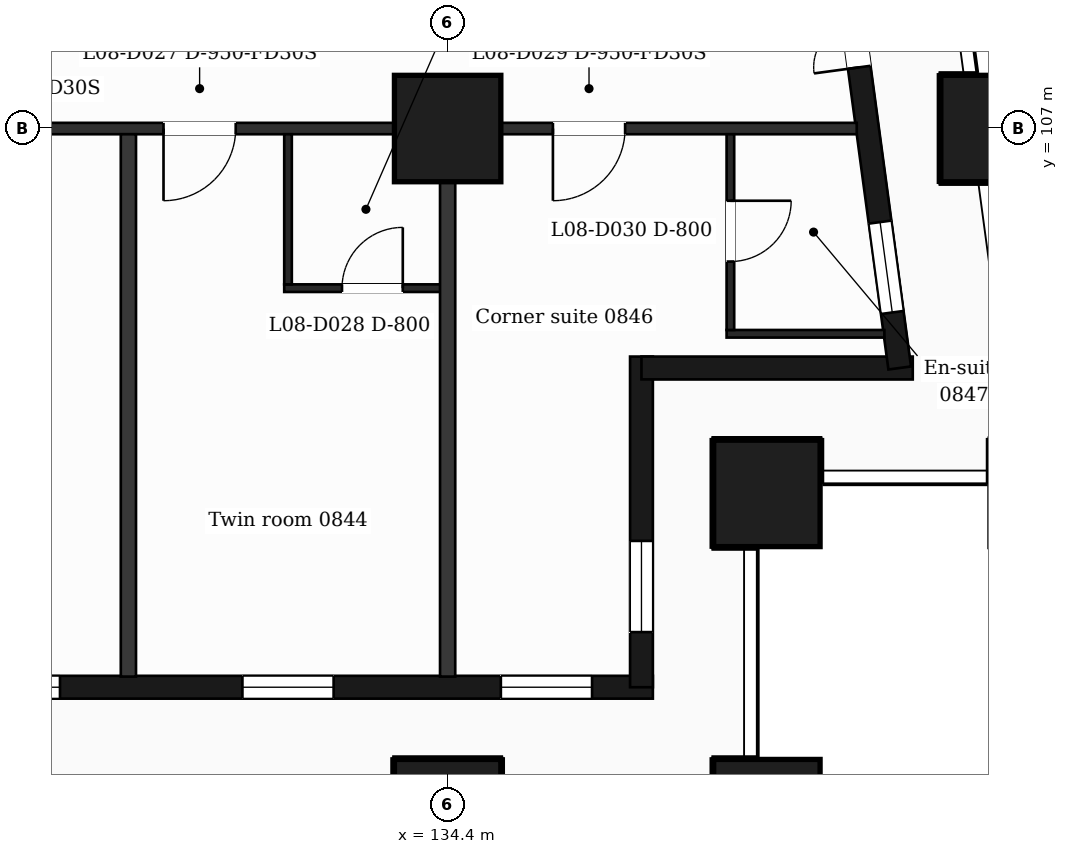
"""IFC4 building model, lengths in metres.
Left out: names, types, materials, properties, quantities, classifications, styles, units other than length and angle.
Written with IfcOpenShell. Run it as: python <this file> out.ifc"""

import sys

from ifc_helpers import new_model, si_unit, direction, frame, frame_2d, origin, origin_2d, place, context, subcontext, project, spatial, rectangle, extrude, element, fill, save


model = new_model("IFC4")
c1 = context("Model", 3, precision=1e-05, world=origin(), true_north=direction((0.0, 1.0)))
c2 = subcontext(c1, "Body", "Model", "MODEL_VIEW")
j1 = project(units=[si_unit("LENGTHUNIT", "METRE"), si_unit("PLANEANGLEUNIT", "RADIAN")], contexts=[c1])
p1 = place(None, origin())
s1 = spatial("IfcSite", under=j1, at=p1, CompositionType="ELEMENT")
p2 = place(p1, origin())
s2 = spatial("IfcBuilding", under=s1, at=p2, CompositionType="ELEMENT")
p3 = place(p2, frame((0.0, 0.0, 46.0)))
s3 = spatial("IfcBuildingStorey", under=s2, at=p3, CompositionType="ELEMENT", Elevation=46.0)
for number, where, z_axis, x_axis in (
    (1, (134.4, 98.0, 0.0), (0.0, 0.0, 1.0), (1.0, 0.0, 0.0)),
    (2, (138.6, 98.0, 0.0), (0.0, 0.0, 1.0), (1.0, 0.0, 0.0)),
    (3, (138.6, 102.2, 0.0), (0.0, 0.0, 1.0), (1.0, 0.0, 0.0)),
    (4, (134.4, 107.0, 0.0), (0.0, 0.0, 1.0), (1.0, 0.0, 0.0)),
    (5, (141.588, 107.0, 0.0), (0.0, 0.0, 1.0), (1.0, 0.0, 0.0)),
):
    element("IfcColumn", number, at=place(p3, frame(where, z_axis=z_axis, x_axis=x_axis)), inside=s3, PredefinedType="COLUMN", context=c2, shape_type="SweptSolid", body=[
        extrude(rectangle(XDim=1.4, YDim=1.4, at=origin_2d()), origin(), (0.0, 0.0, 1.0), 3.5),
    ])
p4 = place(p3, frame((89.85, 99.65, 0.0), z_axis=(0.0, 0.0, 1.0), x_axis=(1.0, 0.0, 0.0)))
e6 = element("IfcWall", 6, at=p4, inside=s3, PredefinedType="SOLIDWALL", context=c2, shape_type="SweptSolid", body=[
    extrude(rectangle(XDim=47.25, YDim=0.3, at=frame_2d((23.625, 0.0))), origin(), (0.0, 0.0, 1.0), 3.18),
])
p5 = place(p4, frame((0.725, 0.0, 0.9)))
e7 = element("IfcOpeningElement", 7, at=p5, cuts=e6, PredefinedType="OPENING", context=c2, shape_type="SweptSolid", body=[
    extrude(rectangle(XDim=1.2, YDim=2.1, at=frame_2d((0.6, 1.05))), frame((0.0, 0.16, 0.0), z_axis=(0.0, -1.0, 0.0), x_axis=(1.0, 0.0, 0.0)), (0.0, 0.0, 1.0), 0.32),
])
p6 = place(p4, frame((3.45, 0.0, 0.9)))
e8 = element("IfcOpeningElement", 8, at=p6, cuts=e6, PredefinedType="OPENING", context=c2, shape_type="SweptSolid", body=[
    extrude(rectangle(XDim=2.4, YDim=2.1, at=frame_2d((1.2, 1.05))), frame((0.0, 0.16, 0.0), z_axis=(0.0, -1.0, 0.0), x_axis=(1.0, 0.0, 0.0)), (0.0, 0.0, 1.0), 0.32),
])
p7 = place(p4, frame((7.65, 0.0, 0.9)))
e9 = element("IfcOpeningElement", 9, at=p7, cuts=e6, PredefinedType="OPENING", context=c2, shape_type="SweptSolid", body=[
    extrude(rectangle(XDim=2.4, YDim=2.1, at=frame_2d((1.2, 1.05))), frame((0.0, 0.16, 0.0), z_axis=(0.0, -1.0, 0.0), x_axis=(1.0, 0.0, 0.0)), (0.0, 0.0, 1.0), 0.32),
])
p8 = place(p4, frame((12.45, 0.0, 0.9)))
e10 = element("IfcOpeningElement", 10, at=p8, cuts=e6, PredefinedType="OPENING", context=c2, shape_type="SweptSolid", body=[
    extrude(rectangle(XDim=1.2, YDim=2.1, at=frame_2d((0.6, 1.05))), frame((0.0, 0.16, 0.0), z_axis=(0.0, -1.0, 0.0), x_axis=(1.0, 0.0, 0.0)), (0.0, 0.0, 1.0), 0.32),
])
p9 = place(p4, frame((16.65, 0.0, 0.9)))
e11 = element("IfcOpeningElement", 11, at=p9, cuts=e6, PredefinedType="OPENING", context=c2, shape_type="SweptSolid", body=[
    extrude(rectangle(XDim=1.2, YDim=2.1, at=frame_2d((0.6, 1.05))), frame((0.0, 0.16, 0.0), z_axis=(0.0, -1.0, 0.0), x_axis=(1.0, 0.0, 0.0)), (0.0, 0.0, 1.0), 0.32),
])
p10 = place(p4, frame((19.95, 0.0, 0.9)))
e12 = element("IfcOpeningElement", 12, at=p10, cuts=e6, PredefinedType="OPENING", context=c2, shape_type="SweptSolid", body=[
    extrude(rectangle(XDim=1.2, YDim=2.1, at=frame_2d((0.6, 1.05))), frame((0.0, 0.16, 0.0), z_axis=(0.0, -1.0, 0.0), x_axis=(1.0, 0.0, 0.0)), (0.0, 0.0, 1.0), 0.32),
])
p11 = place(p4, frame((21.75, 0.0, 0.9)))
e13 = element("IfcOpeningElement", 13, at=p11, cuts=e6, PredefinedType="OPENING", context=c2, shape_type="SweptSolid", body=[
    extrude(rectangle(XDim=1.2, YDim=2.1, at=frame_2d((0.6, 1.05))), frame((0.0, 0.16, 0.0), z_axis=(0.0, -1.0, 0.0), x_axis=(1.0, 0.0, 0.0)), (0.0, 0.0, 1.0), 0.32),
])
p12 = place(p4, frame((25.05, 0.0, 0.0)))
e14 = element("IfcOpeningElement", 14, at=p12, cuts=e6, PredefinedType="OPENING", context=c2, shape_type="SweptSolid", body=[
    extrude(rectangle(XDim=1.2, YDim=2.4, at=frame_2d((0.6, 1.2))), frame((0.0, 0.16, 0.0), z_axis=(0.0, -1.0, 0.0), x_axis=(1.0, 0.0, 0.0)), (0.0, 0.0, 1.0), 0.32),
])
p13 = place(p4, frame((28.35, 0.0, 0.9)))
e15 = element("IfcOpeningElement", 15, at=p13, cuts=e6, PredefinedType="OPENING", context=c2, shape_type="SweptSolid", body=[
    extrude(rectangle(XDim=1.2, YDim=2.1, at=frame_2d((0.6, 1.05))), frame((0.0, 0.16, 0.0), z_axis=(0.0, -1.0, 0.0), x_axis=(1.0, 0.0, 0.0)), (0.0, 0.0, 1.0), 0.32),
])
p14 = place(p4, frame((30.15, 0.0, 0.9)))
e16 = element("IfcOpeningElement", 16, at=p14, cuts=e6, PredefinedType="OPENING", context=c2, shape_type="SweptSolid", body=[
    extrude(rectangle(XDim=1.2, YDim=2.1, at=frame_2d((0.6, 1.05))), frame((0.0, 0.16, 0.0), z_axis=(0.0, -1.0, 0.0), x_axis=(1.0, 0.0, 0.0)), (0.0, 0.0, 1.0), 0.32),
])
p15 = place(p4, frame((32.85, 0.0, 0.9)))
e17 = element("IfcOpeningElement", 17, at=p15, cuts=e6, PredefinedType="OPENING", context=c2, shape_type="SweptSolid", body=[
    extrude(rectangle(XDim=2.4, YDim=2.1, at=frame_2d((1.2, 1.05))), frame((0.0, 0.16, 0.0), z_axis=(0.0, -1.0, 0.0), x_axis=(1.0, 0.0, 0.0)), (0.0, 0.0, 1.0), 0.32),
])
p16 = place(p4, frame((37.05, 0.0, 0.9)))
e18 = element("IfcOpeningElement", 18, at=p16, cuts=e6, PredefinedType="OPENING", context=c2, shape_type="SweptSolid", body=[
    extrude(rectangle(XDim=2.4, YDim=2.1, at=frame_2d((1.2, 1.05))), frame((0.0, 0.16, 0.0), z_axis=(0.0, -1.0, 0.0), x_axis=(1.0, 0.0, 0.0)), (0.0, 0.0, 1.0), 0.32),
])
p17 = place(p4, frame((41.85, 0.0, 0.9)))
e19 = element("IfcOpeningElement", 19, at=p17, cuts=e6, PredefinedType="OPENING", context=c2, shape_type="SweptSolid", body=[
    extrude(rectangle(XDim=1.2, YDim=2.1, at=frame_2d((0.6, 1.05))), frame((0.0, 0.16, 0.0), z_axis=(0.0, -1.0, 0.0), x_axis=(1.0, 0.0, 0.0)), (0.0, 0.0, 1.0), 0.32),
])
p18 = place(p4, frame((45.25, 0.0, 0.9)))
e20 = element("IfcOpeningElement", 20, at=p18, cuts=e6, PredefinedType="OPENING", context=c2, shape_type="SweptSolid", body=[
    extrude(rectangle(XDim=1.2, YDim=2.1, at=frame_2d((0.6, 1.05))), frame((0.0, 0.16, 0.0), z_axis=(0.0, -1.0, 0.0), x_axis=(1.0, 0.0, 0.0)), (0.0, 0.0, 1.0), 0.32),
])
p19 = place(p3, frame((136.95, 99.65, 0.0), z_axis=(0.0, 0.0, 1.0), x_axis=(0.0, 1.0, 0.0)))
e21 = element("IfcWall", 21, at=p19, inside=s3, PredefinedType="SOLIDWALL", context=c2, shape_type="SweptSolid", body=[
    extrude(rectangle(XDim=4.35, YDim=0.3, at=frame_2d((2.175, 0.0))), origin(), (0.0, 0.0, 1.0), 3.18),
])
p20 = place(p19, frame((0.725, 0.0, 0.9)))
e22 = element("IfcOpeningElement", 22, at=p20, cuts=e21, PredefinedType="OPENING", context=c2, shape_type="SweptSolid", body=[
    extrude(rectangle(XDim=1.2, YDim=2.1, at=frame_2d((0.6, 1.05))), frame((0.0, 0.16, 0.0), z_axis=(0.0, -1.0, 0.0), x_axis=(1.0, 0.0, 0.0)), (0.0, 0.0, 1.0), 0.32),
])
p21 = place(p3, frame((136.95, 103.85, 0.0), z_axis=(0.0, 0.0, 1.0), x_axis=(1.0, 0.0, 0.0)))
e23 = element("IfcWall", 23, at=p21, inside=s3, PredefinedType="SOLIDWALL", context=c2, shape_type="SweptSolid", body=[
    extrude(rectangle(XDim=3.569, YDim=0.3, at=frame_2d((1.785, 0.0))), origin(), (0.0, 0.0, 1.0), 3.18),
])
p22 = place(p3, frame((140.348, 103.85, 0.0), z_axis=(0.0, 0.0, 1.0), x_axis=(-0.133431549479, 0.991058031401, 0.0)))
e24 = element("IfcWall", 24, at=p22, inside=s3, PredefinedType="SOLIDWALL", context=c2, shape_type="SweptSolid", body=[
    extrude(rectangle(XDim=6.609, YDim=0.3, at=frame_2d((3.304, 0.0))), origin(), (0.0, 0.0, 1.0), 3.18),
])
p23 = place(p22, frame((0.737, 0.0, 0.9)))
e25 = element("IfcOpeningElement", 25, at=p23, cuts=e24, PredefinedType="OPENING", context=c2, shape_type="SweptSolid", body=[
    extrude(rectangle(XDim=1.2, YDim=2.1, at=frame_2d((0.6, 1.05))), frame((0.0, 0.16, 0.0), z_axis=(0.0, -1.0, 0.0), x_axis=(1.0, 0.0, 0.0)), (0.0, 0.0, 1.0), 0.32),
])
p24 = place(p22, frame((3.991, 0.0, 0.0)))
e26 = element("IfcOpeningElement", 26, at=p24, cuts=e24, PredefinedType="OPENING", context=c2, shape_type="SweptSolid", body=[
    extrude(rectangle(XDim=1.2, YDim=2.4, at=frame_2d((0.6, 1.2))), frame((0.0, 0.16, 0.0), z_axis=(0.0, -1.0, 0.0), x_axis=(1.0, 0.0, 0.0)), (0.0, 0.0, 1.0), 0.32),
])
p25 = place(p3, frame((138.07, 104.3, 0.0), z_axis=(0.0, 0.0, 1.0), x_axis=(1.0, 0.0, 0.0)))
e27 = element("IfcWall", 27, at=p25, inside=s3, PredefinedType="PARTITIONING", context=c2, shape_type="SweptSolid", body=[
    extrude(rectangle(XDim=2.076, YDim=0.1, at=frame_2d((1.038, 0.0))), origin(), (0.0, 0.0, 1.0), 3.18),
])
p26 = place(p3, frame((132.25, 104.9, 0.0), z_axis=(0.0, 0.0, 1.0), x_axis=(1.0, 0.0, 0.0)))
e28 = element("IfcWall", 28, at=p26, inside=s3, PredefinedType="PARTITIONING", context=c2, shape_type="SweptSolid", body=[
    extrude(rectangle(XDim=2.15, YDim=0.1, at=frame_2d((1.075, 0.0))), origin(), (0.0, 0.0, 1.0), 3.18),
])
p27 = place(p26, frame((0.76, 0.0, 0.0)))
e29 = element("IfcOpeningElement", 29, at=p27, cuts=e28, PredefinedType="OPENING", context=c2, shape_type="SweptSolid", body=[
    extrude(rectangle(XDim=0.8, YDim=2.1, at=frame_2d((0.4, 1.05))), frame((0.0, 0.06, 0.0), z_axis=(0.0, -1.0, 0.0), x_axis=(1.0, 0.0, 0.0)), (0.0, 0.0, 1.0), 0.12),
])
p28 = place(p3, frame((87.018, 107.0, 0.0), z_axis=(0.0, 0.0, 1.0), x_axis=(1.0, 0.0, 0.0)))
e30 = element("IfcWall", 30, at=p28, inside=s3, PredefinedType="PARTITIONING", context=c2, shape_type="SweptSolid", body=[
    extrude(rectangle(XDim=52.765, YDim=0.15, at=frame_2d((26.382, 0.0))), origin(), (0.0, 0.0, 1.0), 3.18),
])
p29 = place(p28, frame((1.032, 0.0, 0.0)))
e31 = element("IfcOpeningElement", 31, at=p29, cuts=e30, PredefinedType="OPENING", context=c2, shape_type="SweptSolid", body=[
    extrude(rectangle(XDim=0.95, YDim=2.1, at=frame_2d((0.475, 1.05))), frame((0.0, 0.085, 0.0), z_axis=(0.0, -1.0, 0.0), x_axis=(1.0, 0.0, 0.0)), (0.0, 0.0, 1.0), 0.17),
])
p30 = place(p28, frame((6.369, 0.0, 0.0)))
e32 = element("IfcOpeningElement", 32, at=p30, cuts=e30, PredefinedType="OPENING", context=c2, shape_type="SweptSolid", body=[
    extrude(rectangle(XDim=0.95, YDim=2.1, at=frame_2d((0.475, 1.05))), frame((0.0, 0.085, 0.0), z_axis=(0.0, -1.0, 0.0), x_axis=(1.0, 0.0, 0.0)), (0.0, 0.0, 1.0), 0.17),
])
p31 = place(p28, frame((10.952, 0.0, 0.0)))
e33 = element("IfcOpeningElement", 33, at=p31, cuts=e30, PredefinedType="OPENING", context=c2, shape_type="SweptSolid", body=[
    extrude(rectangle(XDim=0.95, YDim=2.1, at=frame_2d((0.475, 1.05))), frame((0.0, 0.085, 0.0), z_axis=(0.0, -1.0, 0.0), x_axis=(1.0, 0.0, 0.0)), (0.0, 0.0, 1.0), 0.17),
])
p32 = place(p28, frame((16.045, 0.0, 0.0)))
e34 = element("IfcOpeningElement", 34, at=p32, cuts=e30, PredefinedType="OPENING", context=c2, shape_type="SweptSolid", body=[
    extrude(rectangle(XDim=0.95, YDim=2.1, at=frame_2d((0.475, 1.05))), frame((0.0, 0.085, 0.0), z_axis=(0.0, -1.0, 0.0), x_axis=(1.0, 0.0, 0.0)), (0.0, 0.0, 1.0), 0.17),
])
p33 = place(p28, frame((20.245, 0.0, 0.0)))
e35 = element("IfcOpeningElement", 35, at=p33, cuts=e30, PredefinedType="OPENING", context=c2, shape_type="SweptSolid", body=[
    extrude(rectangle(XDim=0.95, YDim=2.1, at=frame_2d((0.475, 1.05))), frame((0.0, 0.085, 0.0), z_axis=(0.0, -1.0, 0.0), x_axis=(1.0, 0.0, 0.0)), (0.0, 0.0, 1.0), 0.17),
])
p34 = place(p28, frame((24.969, 0.0, 0.0)))
e36 = element("IfcOpeningElement", 36, at=p34, cuts=e30, PredefinedType="OPENING", context=c2, shape_type="SweptSolid", body=[
    extrude(rectangle(XDim=0.95, YDim=2.1, at=frame_2d((0.475, 1.05))), frame((0.0, 0.085, 0.0), z_axis=(0.0, -1.0, 0.0), x_axis=(1.0, 0.0, 0.0)), (0.0, 0.0, 1.0), 0.17),
])
p35 = place(p28, frame((26.807, 0.0, 0.0)))
e37 = element("IfcOpeningElement", 37, at=p35, cuts=e30, PredefinedType="OPENING", context=c2, shape_type="SweptSolid", body=[
    extrude(rectangle(XDim=0.95, YDim=2.1, at=frame_2d((0.475, 1.05))), frame((0.0, 0.085, 0.0), z_axis=(0.0, -1.0, 0.0), x_axis=(1.0, 0.0, 0.0)), (0.0, 0.0, 1.0), 0.17),
])
p36 = place(p28, frame((31.952, 0.0, 0.0)))
e38 = element("IfcOpeningElement", 38, at=p36, cuts=e30, PredefinedType="OPENING", context=c2, shape_type="SweptSolid", body=[
    extrude(rectangle(XDim=0.95, YDim=2.1, at=frame_2d((0.475, 1.05))), frame((0.0, 0.085, 0.0), z_axis=(0.0, -1.0, 0.0), x_axis=(1.0, 0.0, 0.0)), (0.0, 0.0, 1.0), 0.17),
])
p37 = place(p28, frame((40.795, 0.0, 0.0)))
e39 = element("IfcOpeningElement", 39, at=p37, cuts=e30, PredefinedType="OPENING", context=c2, shape_type="SweptSolid", body=[
    extrude(rectangle(XDim=0.95, YDim=2.1, at=frame_2d((0.475, 1.05))), frame((0.0, 0.085, 0.0), z_axis=(0.0, -1.0, 0.0), x_axis=(1.0, 0.0, 0.0)), (0.0, 0.0, 1.0), 0.17),
])
p38 = place(p28, frame((43.644, 0.0, 0.0)))
e40 = element("IfcOpeningElement", 40, at=p38, cuts=e30, PredefinedType="OPENING", context=c2, shape_type="SweptSolid", body=[
    extrude(rectangle(XDim=0.95, YDim=2.1, at=frame_2d((0.475, 1.05))), frame((0.0, 0.085, 0.0), z_axis=(0.0, -1.0, 0.0), x_axis=(1.0, 0.0, 0.0)), (0.0, 0.0, 1.0), 0.17),
])
p39 = place(p28, frame((48.767, 0.0, 0.0)))
e41 = element("IfcOpeningElement", 41, at=p39, cuts=e30, PredefinedType="OPENING", context=c2, shape_type="SweptSolid", body=[
    extrude(rectangle(XDim=0.95, YDim=2.1, at=frame_2d((0.475, 1.05))), frame((0.0, 0.085, 0.0), z_axis=(0.0, -1.0, 0.0), x_axis=(1.0, 0.0, 0.0)), (0.0, 0.0, 1.0), 0.17),
])
p40 = place(p3, frame((130.2, 99.79, 0.0), z_axis=(0.0, 0.0, 1.0), x_axis=(0.0, 1.0, 0.0)))
e42 = element("IfcWall", 42, at=p40, inside=s3, PredefinedType="PARTITIONING", context=c2, shape_type="SweptSolid", body=[
    extrude(rectangle(XDim=7.135, YDim=0.2, at=frame_2d((3.567, 0.0))), origin(), (0.0, 0.0, 1.0), 3.18),
])
p41 = place(p3, frame((132.3, 104.95, 0.0), z_axis=(0.0, 0.0, 1.0), x_axis=(0.0, 1.0, 0.0)))
e43 = element("IfcWall", 43, at=p41, inside=s3, PredefinedType="PARTITIONING", context=c2, shape_type="SweptSolid", body=[
    extrude(rectangle(XDim=1.975, YDim=0.1, at=frame_2d((0.988, 0.0))), origin(), (0.0, 0.0, 1.0), 3.18),
])
p42 = place(p3, frame((134.4, 99.79, 0.0), z_axis=(0.0, 0.0, 1.0), x_axis=(0.0, 1.0, 0.0)))
e44 = element("IfcWall", 44, at=p42, inside=s3, PredefinedType="PARTITIONING", context=c2, shape_type="SweptSolid", body=[
    extrude(rectangle(XDim=7.135, YDim=0.2, at=frame_2d((3.567, 0.0))), origin(), (0.0, 0.0, 1.0), 3.18),
])
p43 = place(p3, frame((138.12, 104.35, 0.0), z_axis=(0.0, 0.0, 1.0), x_axis=(0.0, 1.0, 0.0)))
e45 = element("IfcWall", 45, at=p43, inside=s3, PredefinedType="PARTITIONING", context=c2, shape_type="SweptSolid", body=[
    extrude(rectangle(XDim=2.575, YDim=0.1, at=frame_2d((1.288, 0.0))), origin(), (0.0, 0.0, 1.0), 3.18),
])
p44 = place(p43, frame((0.9, 0.0, 0.0)))
e46 = element("IfcOpeningElement", 46, at=p44, cuts=e45, PredefinedType="OPENING", context=c2, shape_type="SweptSolid", body=[
    extrude(rectangle(XDim=0.8, YDim=2.1, at=frame_2d((0.4, 1.05))), frame((0.0, 0.06, 0.0), z_axis=(0.0, -1.0, 0.0), x_axis=(1.0, 0.0, 0.0)), (0.0, 0.0, 1.0), 0.12),
])
p45 = place(p16, origin())
e47 = element("IfcWindow", 47, at=p45, inside=s3, PartitioningType="SINGLE_PANEL", PredefinedType="WINDOW", context=c2, shape_type="SweptSolid", body=[
    extrude(rectangle(XDim=2.4, YDim=2.1, at=frame_2d((1.2, 1.05))), frame((0.0, 0.03, 0.0), z_axis=(0.0, -1.0, 0.0), x_axis=(1.0, 0.0, 0.0)), (0.0, 0.0, 1.0), 0.06),
])
fill(e18, e47)
p46 = place(p17, origin())
e48 = element("IfcWindow", 48, at=p46, inside=s3, PartitioningType="SINGLE_PANEL", PredefinedType="WINDOW", context=c2, shape_type="SweptSolid", body=[
    extrude(rectangle(XDim=1.2, YDim=2.1, at=frame_2d((0.6, 1.05))), frame((0.0, 0.03, 0.0), z_axis=(0.0, -1.0, 0.0), x_axis=(1.0, 0.0, 0.0)), (0.0, 0.0, 1.0), 0.06),
])
fill(e19, e48)
p47 = place(p18, origin())
e49 = element("IfcWindow", 49, at=p47, inside=s3, PartitioningType="SINGLE_PANEL", PredefinedType="WINDOW", context=c2, shape_type="SweptSolid", body=[
    extrude(rectangle(XDim=1.2, YDim=2.1, at=frame_2d((0.6, 1.05))), frame((0.0, 0.03, 0.0), z_axis=(0.0, -1.0, 0.0), x_axis=(1.0, 0.0, 0.0)), (0.0, 0.0, 1.0), 0.06),
])
fill(e20, e49)
p48 = place(p20, origin())
e50 = element("IfcWindow", 50, at=p48, inside=s3, PartitioningType="SINGLE_PANEL", PredefinedType="WINDOW", context=c2, shape_type="SweptSolid", body=[
    extrude(rectangle(XDim=1.2, YDim=2.1, at=frame_2d((0.6, 1.05))), frame((0.0, 0.03, 0.0), z_axis=(0.0, -1.0, 0.0), x_axis=(1.0, 0.0, 0.0)), (0.0, 0.0, 1.0), 0.06),
])
fill(e22, e50)
p49 = place(p23, origin())
e51 = element("IfcWindow", 51, at=p49, inside=s3, PartitioningType="SINGLE_PANEL", PredefinedType="WINDOW", context=c2, shape_type="SweptSolid", body=[
    extrude(rectangle(XDim=1.2, YDim=2.1, at=frame_2d((0.6, 1.05))), frame((0.0, 0.03, 0.0), z_axis=(0.0, -1.0, 0.0), x_axis=(1.0, 0.0, 0.0)), (0.0, 0.0, 1.0), 0.06),
])
fill(e25, e51)
p50 = place(p24, origin())
e52 = element("IfcDoor", 52, at=p50, inside=s3, OperationType="DOUBLE_DOOR_SINGLE_SWING", PredefinedType="DOOR", context=c2, shape_type="SweptSolid", body=[
    extrude(rectangle(XDim=1.2, YDim=2.4, at=frame_2d((0.6, 1.2))), frame((0.0, 0.025, 0.0), z_axis=(0.0, -1.0, 0.0), x_axis=(1.0, 0.0, 0.0)), (0.0, 0.0, 1.0), 0.05),
])
fill(e26, e52)
p51 = place(p38, origin())
e53 = element("IfcDoor", 53, at=p51, inside=s3, OperationType="SINGLE_SWING_LEFT", PredefinedType="DOOR", context=c2, shape_type="SweptSolid", body=[
    extrude(rectangle(XDim=0.95, YDim=2.1, at=frame_2d((0.475, 1.05))), frame((0.0, 0.025, 0.0), z_axis=(0.0, -1.0, 0.0), x_axis=(1.0, 0.0, 0.0)), (0.0, 0.0, 1.0), 0.05),
])
fill(e40, e53)
p52 = place(p27, origin())
e54 = element("IfcDoor", 54, at=p52, inside=s3, OperationType="SINGLE_SWING_RIGHT", PredefinedType="DOOR", context=c2, shape_type="SweptSolid", body=[
    extrude(rectangle(XDim=0.8, YDim=2.1, at=frame_2d((0.4, 1.05))), frame((0.0, 0.025, 0.0), z_axis=(0.0, -1.0, 0.0), x_axis=(1.0, 0.0, 0.0)), (0.0, 0.0, 1.0), 0.05),
])
fill(e29, e54)
p53 = place(p39, origin())
e55 = element("IfcDoor", 55, at=p53, inside=s3, OperationType="SINGLE_SWING_LEFT", PredefinedType="DOOR", context=c2, shape_type="SweptSolid", body=[
    extrude(rectangle(XDim=0.95, YDim=2.1, at=frame_2d((0.475, 1.05))), frame((0.0, 0.025, 0.0), z_axis=(0.0, -1.0, 0.0), x_axis=(1.0, 0.0, 0.0)), (0.0, 0.0, 1.0), 0.05),
])
fill(e41, e55)
p54 = place(p44, origin())
e56 = element("IfcDoor", 56, at=p54, inside=s3, OperationType="SINGLE_SWING_RIGHT", PredefinedType="DOOR", context=c2, shape_type="SweptSolid", body=[
    extrude(rectangle(XDim=0.8, YDim=2.1, at=frame_2d((0.4, 1.05))), frame((0.0, 0.025, 0.0), z_axis=(0.0, -1.0, 0.0), x_axis=(1.0, 0.0, 0.0)), (0.0, 0.0, 1.0), 0.05),
])
fill(e46, e56)
save(model, sys.argv[1])
